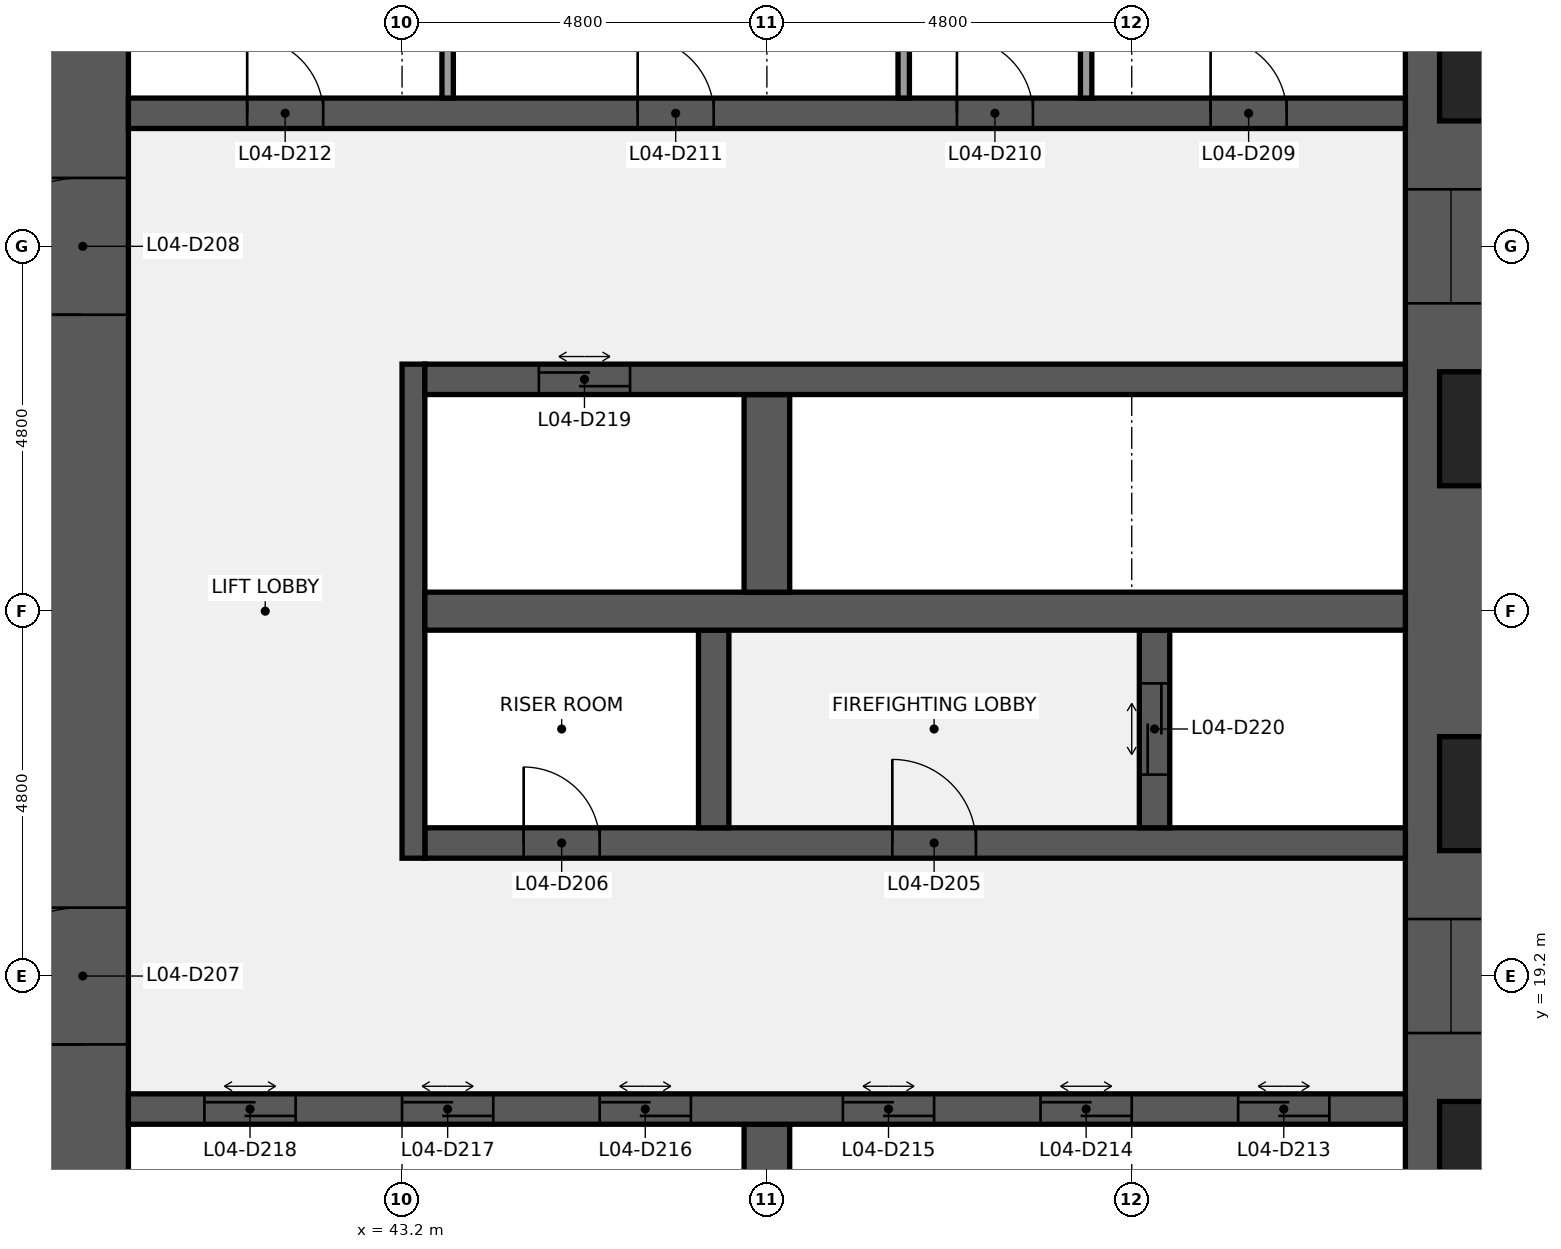
"""IFC4 building model, lengths in metres.
Left out: names, types, materials, properties, quantities, classifications, styles, units other than length and angle.
Written with IfcOpenShell. Run it as: python <this file> out.ifc"""

import sys

from ifc_helpers import new_model, si_unit, direction, frame, frame_2d, origin, place, context, subcontext, project, spatial, rectangle, extrude, element, fill, save


model = new_model("IFC4")
c1 = context("Model", 3, precision=1e-05, world=origin(), true_north=direction((0.0, 1.0)))
c2 = subcontext(c1, "Body", "Model", "MODEL_VIEW")
j1 = project(units=[si_unit("LENGTHUNIT", "METRE"), si_unit("PLANEANGLEUNIT", "RADIAN")], contexts=[c1])
p1 = place(None, origin())
s1 = spatial("IfcSite", under=j1, at=p1, CompositionType="ELEMENT")
p2 = place(p1, origin())
s2 = spatial("IfcBuilding", under=s1, at=p2, CompositionType="ELEMENT")
p3 = place(p2, frame((0.0, 0.0, 25.8)))
s3 = spatial("IfcBuildingStorey", under=s2, at=p3, CompositionType="ELEMENT", Elevation=25.8)
p4 = place(p3, frame((57.0, 38.4, 0.0), z_axis=(0.0, 0.0, 1.0), x_axis=(0.0, -1.0, 0.0)))
e1 = element("IfcWall", 1, at=p4, inside=s3, PredefinedType="SHEAR", context=c2, shape_type="SweptSolid", body=[
    extrude(rectangle(XDim=28.8, YDim=1.2, at=frame_2d((14.4, 0.0))), origin(), (0.0, 0.0, 1.0), 4.24),
])
p5 = place(p4, frame((18.45, 0.0, 0.9)))
e2 = element("IfcOpeningElement", 2, at=p5, cuts=e1, PredefinedType="OPENING", context=c2, shape_type="SweptSolid", body=[
    extrude(rectangle(XDim=1.5, YDim=1.5, at=frame_2d((0.75, 0.75))), frame((0.0, 0.61, 0.0), z_axis=(0.0, -1.0, 0.0), x_axis=(1.0, 0.0, 0.0)), (0.0, 0.0, 1.0), 1.22),
])
p6 = place(p4, frame((8.85, 0.0, 0.9)))
e3 = element("IfcOpeningElement", 3, at=p6, cuts=e1, PredefinedType="OPENING", context=c2, shape_type="SweptSolid", body=[
    extrude(rectangle(XDim=1.5, YDim=1.5, at=frame_2d((0.75, 0.75))), frame((0.0, 0.61, 0.0), z_axis=(0.0, -1.0, 0.0), x_axis=(1.0, 0.0, 0.0)), (0.0, 0.0, 1.0), 1.22),
])
p7 = place(p3, frame((39.0, 9.6, 0.0), z_axis=(0.0, 0.0, 1.0), x_axis=(0.0, 1.0, 0.0)))
e4 = element("IfcWall", 4, at=p7, inside=s3, PredefinedType="SHEAR", context=c2, shape_type="SweptSolid", body=[
    extrude(rectangle(XDim=28.8, YDim=1.2, at=frame_2d((14.4, 0.0))), origin(), (0.0, 0.0, 1.0), 4.24),
])
p8 = place(p7, frame((8.7, 0.0, 0.0)))
e5 = element("IfcOpeningElement", 5, at=p8, cuts=e4, PredefinedType="OPENING", context=c2, shape_type="SweptSolid", body=[
    extrude(rectangle(XDim=1.8, YDim=2.1, at=frame_2d((0.9, 1.05))), frame((0.0, 0.61, 0.0), z_axis=(0.0, -1.0, 0.0), x_axis=(1.0, 0.0, 0.0)), (0.0, 0.0, 1.0), 1.22),
])
p9 = place(p7, frame((18.3, 0.0, 0.0)))
e6 = element("IfcOpeningElement", 6, at=p9, cuts=e4, PredefinedType="OPENING", context=c2, shape_type="SweptSolid", body=[
    extrude(rectangle(XDim=1.8, YDim=2.1, at=frame_2d((0.9, 1.05))), frame((0.0, 0.61, 0.0), z_axis=(0.0, -1.0, 0.0), x_axis=(1.0, 0.0, 0.0)), (0.0, 0.0, 1.0), 1.22),
])
p10 = place(p3, frame((48.0, 14.65, 0.0), z_axis=(0.0, 0.0, 1.0), x_axis=(0.0, 1.0, 0.0)))
e7 = element("IfcWall", 7, at=p10, inside=s3, PredefinedType="SHEAR", context=c2, shape_type="SweptSolid", body=[
    extrude(rectangle(XDim=2.6, YDim=0.6, at=frame_2d((1.3, 0.0))), origin(), (0.0, 0.0, 1.0), 4.24),
])
p11 = place(p3, frame((39.6, 17.45, 0.0), z_axis=(0.0, 0.0, 1.0), x_axis=(1.0, 0.0, 0.0)))
e8 = element("IfcWall", 8, at=p11, inside=s3, PredefinedType="SHEAR", context=c2, shape_type="SweptSolid", body=[
    extrude(rectangle(XDim=16.8, YDim=0.4, at=frame_2d((8.4, 0.0))), origin(), (0.0, 0.0, 1.0), 4.24),
])
p12 = place(p11, frame((14.6, 0.0, 0.0)))
e9 = element("IfcOpeningElement", 9, at=p12, cuts=e8, PredefinedType="OPENING", context=c2, shape_type="SweptSolid", body=[
    extrude(rectangle(XDim=1.2, YDim=2.1, at=frame_2d((0.6, 1.05))), frame((0.0, 0.21, 0.0), z_axis=(0.0, -1.0, 0.0), x_axis=(1.0, 0.0, 0.0)), (0.0, 0.0, 1.0), 0.42),
])
p13 = place(p11, frame((12.0, 0.0, 0.0)))
e10 = element("IfcOpeningElement", 10, at=p13, cuts=e8, PredefinedType="OPENING", context=c2, shape_type="SweptSolid", body=[
    extrude(rectangle(XDim=1.2, YDim=2.1, at=frame_2d((0.6, 1.05))), frame((0.0, 0.21, 0.0), z_axis=(0.0, -1.0, 0.0), x_axis=(1.0, 0.0, 0.0)), (0.0, 0.0, 1.0), 0.42),
])
p14 = place(p11, frame((9.4, 0.0, 0.0)))
e11 = element("IfcOpeningElement", 11, at=p14, cuts=e8, PredefinedType="OPENING", context=c2, shape_type="SweptSolid", body=[
    extrude(rectangle(XDim=1.2, YDim=2.1, at=frame_2d((0.6, 1.05))), frame((0.0, 0.21, 0.0), z_axis=(0.0, -1.0, 0.0), x_axis=(1.0, 0.0, 0.0)), (0.0, 0.0, 1.0), 0.42),
])
p15 = place(p11, frame((6.2, 0.0, 0.0)))
e12 = element("IfcOpeningElement", 12, at=p15, cuts=e8, PredefinedType="OPENING", context=c2, shape_type="SweptSolid", body=[
    extrude(rectangle(XDim=1.2, YDim=2.1, at=frame_2d((0.6, 1.05))), frame((0.0, 0.21, 0.0), z_axis=(0.0, -1.0, 0.0), x_axis=(1.0, 0.0, 0.0)), (0.0, 0.0, 1.0), 0.42),
])
p16 = place(p11, frame((3.6, 0.0, 0.0)))
e13 = element("IfcOpeningElement", 13, at=p16, cuts=e8, PredefinedType="OPENING", context=c2, shape_type="SweptSolid", body=[
    extrude(rectangle(XDim=1.2, YDim=2.1, at=frame_2d((0.6, 1.05))), frame((0.0, 0.21, 0.0), z_axis=(0.0, -1.0, 0.0), x_axis=(1.0, 0.0, 0.0)), (0.0, 0.0, 1.0), 0.42),
])
p17 = place(p11, frame((1.0, 0.0, 0.0)))
e14 = element("IfcOpeningElement", 14, at=p17, cuts=e8, PredefinedType="OPENING", context=c2, shape_type="SweptSolid", body=[
    extrude(rectangle(XDim=1.2, YDim=2.1, at=frame_2d((0.6, 1.05))), frame((0.0, 0.21, 0.0), z_axis=(0.0, -1.0, 0.0), x_axis=(1.0, 0.0, 0.0)), (0.0, 0.0, 1.0), 0.42),
])
p18 = place(p3, frame((43.5, 20.95, 0.0), z_axis=(0.0, 0.0, 1.0), x_axis=(1.0, 0.0, 0.0)))
e15 = element("IfcWall", 15, at=p18, inside=s3, PredefinedType="SHEAR", context=c2, shape_type="SweptSolid", body=[
    extrude(rectangle(XDim=12.9, YDim=0.4, at=frame_2d((6.45, 0.0))), origin(), (0.0, 0.0, 1.0), 4.24),
])
p19 = place(p18, frame((6.15, 0.0, 0.0)))
e16 = element("IfcOpeningElement", 16, at=p19, cuts=e15, PredefinedType="OPENING", context=c2, shape_type="SweptSolid", body=[
    extrude(rectangle(XDim=1.1, YDim=2.1, at=frame_2d((0.55, 1.05))), frame((0.0, 0.21, 0.0), z_axis=(0.0, -1.0, 0.0), x_axis=(1.0, 0.0, 0.0)), (0.0, 0.0, 1.0), 0.42),
])
p20 = place(p18, frame((1.3, 0.0, 0.0)))
e17 = element("IfcOpeningElement", 17, at=p20, cuts=e15, PredefinedType="OPENING", context=c2, shape_type="SweptSolid", body=[
    extrude(rectangle(XDim=1.0, YDim=2.1, at=frame_2d((0.5, 1.05))), frame((0.0, 0.21, 0.0), z_axis=(0.0, -1.0, 0.0), x_axis=(1.0, 0.0, 0.0)), (0.0, 0.0, 1.0), 0.42),
])
p21 = place(p3, frame((43.35, 20.75, 0.0), z_axis=(0.0, 0.0, 1.0), x_axis=(0.0, 1.0, 0.0)))
e18 = element("IfcWall", 18, at=p21, inside=s3, PredefinedType="SHEAR", context=c2, shape_type="SweptSolid", body=[
    extrude(rectangle(XDim=6.5, YDim=0.3, at=frame_2d((3.25, 0.0))), origin(), (0.0, 0.0, 1.0), 4.24),
])
p22 = place(p3, frame((53.1, 21.15, 0.0), z_axis=(0.0, 0.0, 1.0), x_axis=(0.0, 1.0, 0.0)))
e19 = element("IfcWall", 19, at=p22, inside=s3, PredefinedType="SHEAR", context=c2, shape_type="SweptSolid", body=[
    extrude(rectangle(XDim=2.6, YDim=0.4, at=frame_2d((1.3, 0.0))), origin(), (0.0, 0.0, 1.0), 4.24),
])
p23 = place(p22, frame((0.7, 0.0, 0.0)))
e20 = element("IfcOpeningElement", 20, at=p23, cuts=e19, PredefinedType="OPENING", context=c2, shape_type="SweptSolid", body=[
    extrude(rectangle(XDim=1.2, YDim=2.1, at=frame_2d((0.6, 1.05))), frame((0.0, 0.21, 0.0), z_axis=(0.0, -1.0, 0.0), x_axis=(1.0, 0.0, 0.0)), (0.0, 0.0, 1.0), 0.42),
])
p24 = place(p3, frame((47.3, 21.15, 0.0), z_axis=(0.0, 0.0, 1.0), x_axis=(0.0, 1.0, 0.0)))
e21 = element("IfcWall", 21, at=p24, inside=s3, PredefinedType="SHEAR", context=c2, shape_type="SweptSolid", body=[
    extrude(rectangle(XDim=2.6, YDim=0.4, at=frame_2d((1.3, 0.0))), origin(), (0.0, 0.0, 1.0), 4.24),
])
p25 = place(p3, frame((43.5, 24.0, 0.0), z_axis=(0.0, 0.0, 1.0), x_axis=(1.0, 0.0, 0.0)))
e22 = element("IfcWall", 22, at=p25, inside=s3, PredefinedType="SHEAR", context=c2, shape_type="SweptSolid", body=[
    extrude(rectangle(XDim=12.9, YDim=0.5, at=frame_2d((6.45, 0.0))), origin(), (0.0, 0.0, 1.0), 4.24),
])
p26 = place(p3, frame((48.0, 24.25, 0.0), z_axis=(0.0, 0.0, 1.0), x_axis=(0.0, 1.0, 0.0)))
e23 = element("IfcWall", 23, at=p26, inside=s3, PredefinedType="SHEAR", context=c2, shape_type="SweptSolid", body=[
    extrude(rectangle(XDim=2.6, YDim=0.6, at=frame_2d((1.3, 0.0))), origin(), (0.0, 0.0, 1.0), 4.24),
])
p27 = place(p3, frame((43.5, 27.05, 0.0), z_axis=(0.0, 0.0, 1.0), x_axis=(1.0, 0.0, 0.0)))
e24 = element("IfcWall", 24, at=p27, inside=s3, PredefinedType="SHEAR", context=c2, shape_type="SweptSolid", body=[
    extrude(rectangle(XDim=12.9, YDim=0.4, at=frame_2d((6.45, 0.0))), origin(), (0.0, 0.0, 1.0), 4.24),
])
p28 = place(p27, frame((1.5, 0.0, 0.0)))
e25 = element("IfcOpeningElement", 25, at=p28, cuts=e24, PredefinedType="OPENING", context=c2, shape_type="SweptSolid", body=[
    extrude(rectangle(XDim=1.2, YDim=2.1, at=frame_2d((0.6, 1.05))), frame((0.0, 0.21, 0.0), z_axis=(0.0, -1.0, 0.0), x_axis=(1.0, 0.0, 0.0)), (0.0, 0.0, 1.0), 0.42),
])
p29 = place(p3, frame((39.6, 30.55, 0.0), z_axis=(0.0, 0.0, 1.0), x_axis=(1.0, 0.0, 0.0)))
e26 = element("IfcWall", 26, at=p29, inside=s3, PredefinedType="SHEAR", context=c2, shape_type="SweptSolid", body=[
    extrude(rectangle(XDim=16.8, YDim=0.4, at=frame_2d((8.4, 0.0))), origin(), (0.0, 0.0, 1.0), 4.24),
])
p30 = place(p29, frame((14.238, 0.0, 0.0)))
e27 = element("IfcOpeningElement", 27, at=p30, cuts=e26, PredefinedType="OPENING", context=c2, shape_type="SweptSolid", body=[
    extrude(rectangle(XDim=1.0, YDim=2.1, at=frame_2d((0.5, 1.05))), frame((0.0, 0.21, 0.0), z_axis=(0.0, -1.0, 0.0), x_axis=(1.0, 0.0, 0.0)), (0.0, 0.0, 1.0), 0.42),
])
p31 = place(p29, frame((10.9, 0.0, 0.0)))
e28 = element("IfcOpeningElement", 28, at=p31, cuts=e26, PredefinedType="OPENING", context=c2, shape_type="SweptSolid", body=[
    extrude(rectangle(XDim=1.0, YDim=2.1, at=frame_2d((0.5, 1.05))), frame((0.0, 0.21, 0.0), z_axis=(0.0, -1.0, 0.0), x_axis=(1.0, 0.0, 0.0)), (0.0, 0.0, 1.0), 0.42),
])
p32 = place(p29, frame((6.7, 0.0, 0.0)))
e29 = element("IfcOpeningElement", 29, at=p32, cuts=e26, PredefinedType="OPENING", context=c2, shape_type="SweptSolid", body=[
    extrude(rectangle(XDim=1.0, YDim=2.1, at=frame_2d((0.5, 1.05))), frame((0.0, 0.21, 0.0), z_axis=(0.0, -1.0, 0.0), x_axis=(1.0, 0.0, 0.0)), (0.0, 0.0, 1.0), 0.42),
])
p33 = place(p29, frame((1.562, 0.0, 0.0)))
e30 = element("IfcOpeningElement", 30, at=p33, cuts=e26, PredefinedType="OPENING", context=c2, shape_type="SweptSolid", body=[
    extrude(rectangle(XDim=1.0, YDim=2.1, at=frame_2d((0.5, 1.05))), frame((0.0, 0.21, 0.0), z_axis=(0.0, -1.0, 0.0), x_axis=(1.0, 0.0, 0.0)), (0.0, 0.0, 1.0), 0.42),
])
for number, where, z_axis, x_axis in (
    (31, (52.2, 30.75, 0.0), (0.0, 0.0, 1.0), (0.0, 1.0, 0.0)),
    (32, (49.8, 30.75, 0.0), (0.0, 0.0, 1.0), (0.0, 1.0, 0.0)),
    (33, (43.8, 30.75, 0.0), (0.0, 0.0, 1.0), (0.0, 1.0, 0.0)),
):
    element("IfcWall", number, at=place(p3, frame(where, z_axis=z_axis, x_axis=x_axis)), inside=s3, PredefinedType="PARTITIONING", context=c2, shape_type="SweptSolid", body=[
        extrude(rectangle(XDim=2.6, YDim=0.15, at=frame_2d((1.3, 0.0))), origin(), (0.0, 0.0, 1.0), 4.24),
    ])
p34 = place(p19, origin())
e34 = element("IfcDoor", 34, at=p34, inside=s3, OperationType="SINGLE_SWING_LEFT", PredefinedType="DOOR", context=c2, shape_type="SweptSolid", body=[
    extrude(rectangle(XDim=1.1, YDim=2.1, at=frame_2d((0.55, 1.05))), frame((0.0, 0.025, 0.0), z_axis=(0.0, -1.0, 0.0), x_axis=(1.0, 0.0, 0.0)), (0.0, 0.0, 1.0), 0.05),
])
fill(e16, e34)
p35 = place(p20, origin())
e35 = element("IfcDoor", 35, at=p35, inside=s3, OperationType="SINGLE_SWING_LEFT", PredefinedType="DOOR", context=c2, shape_type="SweptSolid", body=[
    extrude(rectangle(XDim=1.0, YDim=2.1, at=frame_2d((0.5, 1.05))), frame((0.0, 0.025, 0.0), z_axis=(0.0, -1.0, 0.0), x_axis=(1.0, 0.0, 0.0)), (0.0, 0.0, 1.0), 0.05),
])
fill(e17, e35)
p36 = place(p8, origin())
e36 = element("IfcDoor", 36, at=p36, inside=s3, OperationType="DOUBLE_DOOR_SINGLE_SWING", PredefinedType="DOOR", context=c2, shape_type="SweptSolid", body=[
    extrude(rectangle(XDim=1.8, YDim=2.1, at=frame_2d((0.9, 1.05))), frame((0.0, 0.025, 0.0), z_axis=(0.0, -1.0, 0.0), x_axis=(1.0, 0.0, 0.0)), (0.0, 0.0, 1.0), 0.05),
])
fill(e5, e36)
p37 = place(p9, origin())
e37 = element("IfcDoor", 37, at=p37, inside=s3, OperationType="DOUBLE_DOOR_SINGLE_SWING", PredefinedType="DOOR", context=c2, shape_type="SweptSolid", body=[
    extrude(rectangle(XDim=1.8, YDim=2.1, at=frame_2d((0.9, 1.05))), frame((0.0, 0.025, 0.0), z_axis=(0.0, -1.0, 0.0), x_axis=(1.0, 0.0, 0.0)), (0.0, 0.0, 1.0), 0.05),
])
fill(e6, e37)
p38 = place(p30, origin())
e38 = element("IfcDoor", 38, at=p38, inside=s3, OperationType="SINGLE_SWING_LEFT", PredefinedType="DOOR", context=c2, shape_type="SweptSolid", body=[
    extrude(rectangle(XDim=1.0, YDim=2.1, at=frame_2d((0.5, 1.05))), frame((0.0, 0.025, 0.0), z_axis=(0.0, -1.0, 0.0), x_axis=(1.0, 0.0, 0.0)), (0.0, 0.0, 1.0), 0.05),
])
fill(e27, e38)
p39 = place(p31, origin())
e39 = element("IfcDoor", 39, at=p39, inside=s3, OperationType="SINGLE_SWING_LEFT", PredefinedType="DOOR", context=c2, shape_type="SweptSolid", body=[
    extrude(rectangle(XDim=1.0, YDim=2.1, at=frame_2d((0.5, 1.05))), frame((0.0, 0.025, 0.0), z_axis=(0.0, -1.0, 0.0), x_axis=(1.0, 0.0, 0.0)), (0.0, 0.0, 1.0), 0.05),
])
fill(e28, e39)
p40 = place(p32, origin())
e40 = element("IfcDoor", 40, at=p40, inside=s3, OperationType="SINGLE_SWING_LEFT", PredefinedType="DOOR", context=c2, shape_type="SweptSolid", body=[
    extrude(rectangle(XDim=1.0, YDim=2.1, at=frame_2d((0.5, 1.05))), frame((0.0, 0.025, 0.0), z_axis=(0.0, -1.0, 0.0), x_axis=(1.0, 0.0, 0.0)), (0.0, 0.0, 1.0), 0.05),
])
fill(e29, e40)
p41 = place(p33, origin())
e41 = element("IfcDoor", 41, at=p41, inside=s3, OperationType="SINGLE_SWING_LEFT", PredefinedType="DOOR", context=c2, shape_type="SweptSolid", body=[
    extrude(rectangle(XDim=1.0, YDim=2.1, at=frame_2d((0.5, 1.05))), frame((0.0, 0.025, 0.0), z_axis=(0.0, -1.0, 0.0), x_axis=(1.0, 0.0, 0.0)), (0.0, 0.0, 1.0), 0.05),
])
fill(e30, e41)
p42 = place(p12, origin())
e42 = element("IfcDoor", 42, at=p42, inside=s3, OperationType="DOUBLE_DOOR_SLIDING", PredefinedType="DOOR", context=c2, shape_type="SweptSolid", body=[
    extrude(rectangle(XDim=1.2, YDim=2.1, at=frame_2d((0.6, 1.05))), frame((0.0, 0.025, 0.0), z_axis=(0.0, -1.0, 0.0), x_axis=(1.0, 0.0, 0.0)), (0.0, 0.0, 1.0), 0.05),
])
fill(e9, e42)
p43 = place(p13, origin())
e43 = element("IfcDoor", 43, at=p43, inside=s3, OperationType="DOUBLE_DOOR_SLIDING", PredefinedType="DOOR", context=c2, shape_type="SweptSolid", body=[
    extrude(rectangle(XDim=1.2, YDim=2.1, at=frame_2d((0.6, 1.05))), frame((0.0, 0.025, 0.0), z_axis=(0.0, -1.0, 0.0), x_axis=(1.0, 0.0, 0.0)), (0.0, 0.0, 1.0), 0.05),
])
fill(e10, e43)
p44 = place(p14, origin())
e44 = element("IfcDoor", 44, at=p44, inside=s3, OperationType="DOUBLE_DOOR_SLIDING", PredefinedType="DOOR", context=c2, shape_type="SweptSolid", body=[
    extrude(rectangle(XDim=1.2, YDim=2.1, at=frame_2d((0.6, 1.05))), frame((0.0, 0.025, 0.0), z_axis=(0.0, -1.0, 0.0), x_axis=(1.0, 0.0, 0.0)), (0.0, 0.0, 1.0), 0.05),
])
fill(e11, e44)
p45 = place(p15, origin())
e45 = element("IfcDoor", 45, at=p45, inside=s3, OperationType="DOUBLE_DOOR_SLIDING", PredefinedType="DOOR", context=c2, shape_type="SweptSolid", body=[
    extrude(rectangle(XDim=1.2, YDim=2.1, at=frame_2d((0.6, 1.05))), frame((0.0, 0.025, 0.0), z_axis=(0.0, -1.0, 0.0), x_axis=(1.0, 0.0, 0.0)), (0.0, 0.0, 1.0), 0.05),
])
fill(e12, e45)
p46 = place(p16, origin())
e46 = element("IfcDoor", 46, at=p46, inside=s3, OperationType="DOUBLE_DOOR_SLIDING", PredefinedType="DOOR", context=c2, shape_type="SweptSolid", body=[
    extrude(rectangle(XDim=1.2, YDim=2.1, at=frame_2d((0.6, 1.05))), frame((0.0, 0.025, 0.0), z_axis=(0.0, -1.0, 0.0), x_axis=(1.0, 0.0, 0.0)), (0.0, 0.0, 1.0), 0.05),
])
fill(e13, e46)
p47 = place(p17, origin())
e47 = element("IfcDoor", 47, at=p47, inside=s3, OperationType="DOUBLE_DOOR_SLIDING", PredefinedType="DOOR", context=c2, shape_type="SweptSolid", body=[
    extrude(rectangle(XDim=1.2, YDim=2.1, at=frame_2d((0.6, 1.05))), frame((0.0, 0.025, 0.0), z_axis=(0.0, -1.0, 0.0), x_axis=(1.0, 0.0, 0.0)), (0.0, 0.0, 1.0), 0.05),
])
fill(e14, e47)
p48 = place(p28, origin())
e48 = element("IfcDoor", 48, at=p48, inside=s3, OperationType="DOUBLE_DOOR_SLIDING", PredefinedType="DOOR", context=c2, shape_type="SweptSolid", body=[
    extrude(rectangle(XDim=1.2, YDim=2.1, at=frame_2d((0.6, 1.05))), frame((0.0, 0.025, 0.0), z_axis=(0.0, -1.0, 0.0), x_axis=(1.0, 0.0, 0.0)), (0.0, 0.0, 1.0), 0.05),
])
fill(e25, e48)
p49 = place(p23, origin())
e49 = element("IfcDoor", 49, at=p49, inside=s3, OperationType="DOUBLE_DOOR_SLIDING", PredefinedType="DOOR", context=c2, shape_type="SweptSolid", body=[
    extrude(rectangle(XDim=1.2, YDim=2.1, at=frame_2d((0.6, 1.05))), frame((0.0, 0.025, 0.0), z_axis=(0.0, -1.0, 0.0), x_axis=(1.0, 0.0, 0.0)), (0.0, 0.0, 1.0), 0.05),
])
fill(e20, e49)
p50 = place(p5, origin())
e50 = element("IfcWindow", 50, at=p50, inside=s3, PartitioningType="SINGLE_PANEL", PredefinedType="WINDOW", context=c2, shape_type="SweptSolid", body=[
    extrude(rectangle(XDim=1.5, YDim=1.5, at=frame_2d((0.75, 0.75))), frame((0.0, 0.03, 0.0), z_axis=(0.0, -1.0, 0.0), x_axis=(1.0, 0.0, 0.0)), (0.0, 0.0, 1.0), 0.06),
])
fill(e2, e50)
p51 = place(p6, origin())
e51 = element("IfcWindow", 51, at=p51, inside=s3, PartitioningType="SINGLE_PANEL", PredefinedType="WINDOW", context=c2, shape_type="SweptSolid", body=[
    extrude(rectangle(XDim=1.5, YDim=1.5, at=frame_2d((0.75, 0.75))), frame((0.0, 0.03, 0.0), z_axis=(0.0, -1.0, 0.0), x_axis=(1.0, 0.0, 0.0)), (0.0, 0.0, 1.0), 0.06),
])
fill(e3, e51)
save(model, sys.argv[1])
